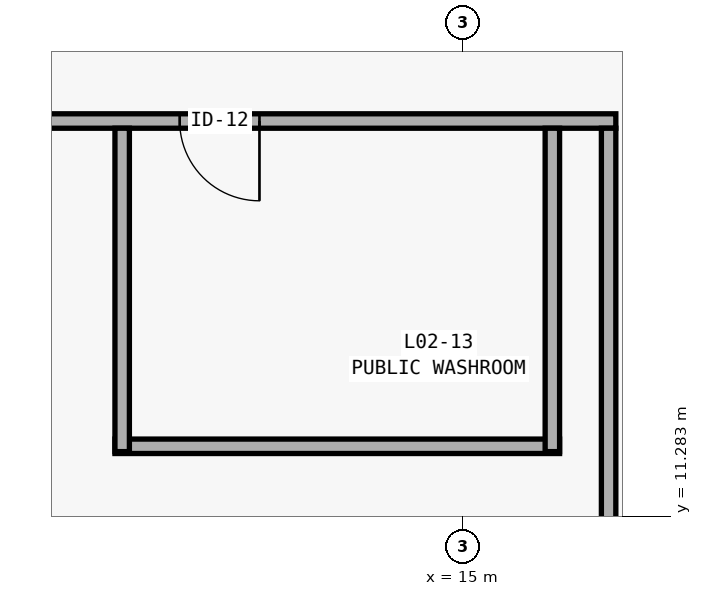
"""IFC4 building model, lengths in metres.
Left out: names, types, materials, properties, quantities, classifications, styles, units other than length and angle.
Written with IfcOpenShell. Run it as: python <this file> out.ifc"""

import sys

from ifc_helpers import new_model, si_unit, direction, frame, frame_2d, origin, place, context, subcontext, project, spatial, rectangle, extrude, element, fill, save


model = new_model("IFC4")
c1 = context("Model", 3, precision=1e-05, world=origin(), true_north=direction((0.0, 1.0)))
c2 = subcontext(c1, "Body", "Model", "MODEL_VIEW")
j1 = project(units=[si_unit("LENGTHUNIT", "METRE"), si_unit("PLANEANGLEUNIT", "RADIAN")], contexts=[c1])
p1 = place(None, origin())
s1 = spatial("IfcSite", under=j1, at=p1, CompositionType="ELEMENT")
p2 = place(p1, origin())
s2 = spatial("IfcBuilding", under=s1, at=p2, CompositionType="ELEMENT")
p3 = place(p2, frame((0.0, 0.0, 9.0)))
s3 = spatial("IfcBuildingStorey", under=s2, at=p3, CompositionType="ELEMENT", Elevation=9.0)
p4 = place(p3, frame((10.425, 12.2, 0.0), z_axis=(0.0, 0.0, 1.0), x_axis=(1.0, 0.0, 0.0)))
e1 = element("IfcWall", 1, at=p4, inside=s3, PredefinedType="PARTITIONING", context=c2, shape_type="SweptSolid", body=[
    extrude(rectangle(XDim=5.85, YDim=0.19, at=frame_2d((2.925, 0.0))), origin(), (0.0, 0.0, 1.0), 6.7),
])
p5 = place(p3, frame((3.295, 16.48, 0.0), z_axis=(0.0, 0.0, 1.0), x_axis=(1.0, 0.0, 0.0)))
e2 = element("IfcWall", 2, at=p5, inside=s3, PredefinedType="PARTITIONING", context=c2, shape_type="SweptSolid", body=[
    extrude(rectangle(XDim=13.72, YDim=0.19, at=frame_2d((6.86, 0.0))), origin(), (0.0, 0.0, 1.0), 6.7),
])
p6 = place(p5, frame((7.981, 0.0, 0.0)))
e3 = element("IfcOpeningElement", 3, at=p6, cuts=e2, PredefinedType="OPENING", context=c2, shape_type="SweptSolid", body=[
    extrude(rectangle(XDim=1.05, YDim=2.1, at=frame_2d((0.525, 1.05))), frame((0.0, 0.11, 0.0), z_axis=(0.0, -1.0, 0.0), x_axis=(1.0, 0.0, 0.0)), (0.0, 0.0, 1.0), 0.22),
])
for number, where, z_axis, x_axis in (
    (4, (10.52, 12.13, 0.0), (0.0, 0.0, 1.0), (0.0, 1.0, 0.0)),
    (5, (16.18, 12.13, 0.0), (0.0, 0.0, 1.0), (0.0, 1.0, 0.0)),
):
    element("IfcWall", number, at=place(p3, frame(where, z_axis=z_axis, x_axis=x_axis)), inside=s3, PredefinedType="PARTITIONING", context=c2, shape_type="SweptSolid", body=[
        extrude(rectangle(XDim=4.255, YDim=0.19, at=frame_2d((2.127, 0.0))), origin(), (0.0, 0.0, 1.0), 6.7),
    ])
p7 = place(p3, frame((16.92, 3.115, 0.0), z_axis=(0.0, 0.0, 1.0), x_axis=(0.0, 1.0, 0.0)))
e6 = element("IfcWall", 6, at=p7, inside=s3, PredefinedType="PARTITIONING", context=c2, shape_type="SweptSolid", body=[
    extrude(rectangle(XDim=13.27, YDim=0.19, at=frame_2d((6.635, 0.0))), origin(), (0.0, 0.0, 1.0), 6.7),
])
p8 = place(p7, frame((1.554, 0.0, 0.0)))
e7 = element("IfcOpeningElement", 7, at=p8, cuts=e6, PredefinedType="OPENING", context=c2, shape_type="SweptSolid", body=[
    extrude(rectangle(XDim=2.2, YDim=2.45, at=frame_2d((1.1, 1.225))), frame((0.0, 0.11, 0.0), z_axis=(0.0, -1.0, 0.0), x_axis=(1.0, 0.0, 0.0)), (0.0, 0.0, 1.0), 0.22),
])
p9 = place(p6, frame((1.05, 0.0, 0.0), z_axis=(0.0, 0.0, 1.0), x_axis=(-1.0, 0.0, 0.0)))
e8 = element("IfcDoor", 8, at=p9, inside=s3, OperationType="SINGLE_SWING_RIGHT", PredefinedType="DOOR", context=c2, shape_type="SweptSolid", body=[
    extrude(rectangle(XDim=1.05, YDim=2.1, at=frame_2d((0.525, 1.05))), frame((0.0, 0.025, 0.0), z_axis=(0.0, -1.0, 0.0), x_axis=(1.0, 0.0, 0.0)), (0.0, 0.0, 1.0), 0.05),
])
fill(e3, e8)
save(model, sys.argv[1])
